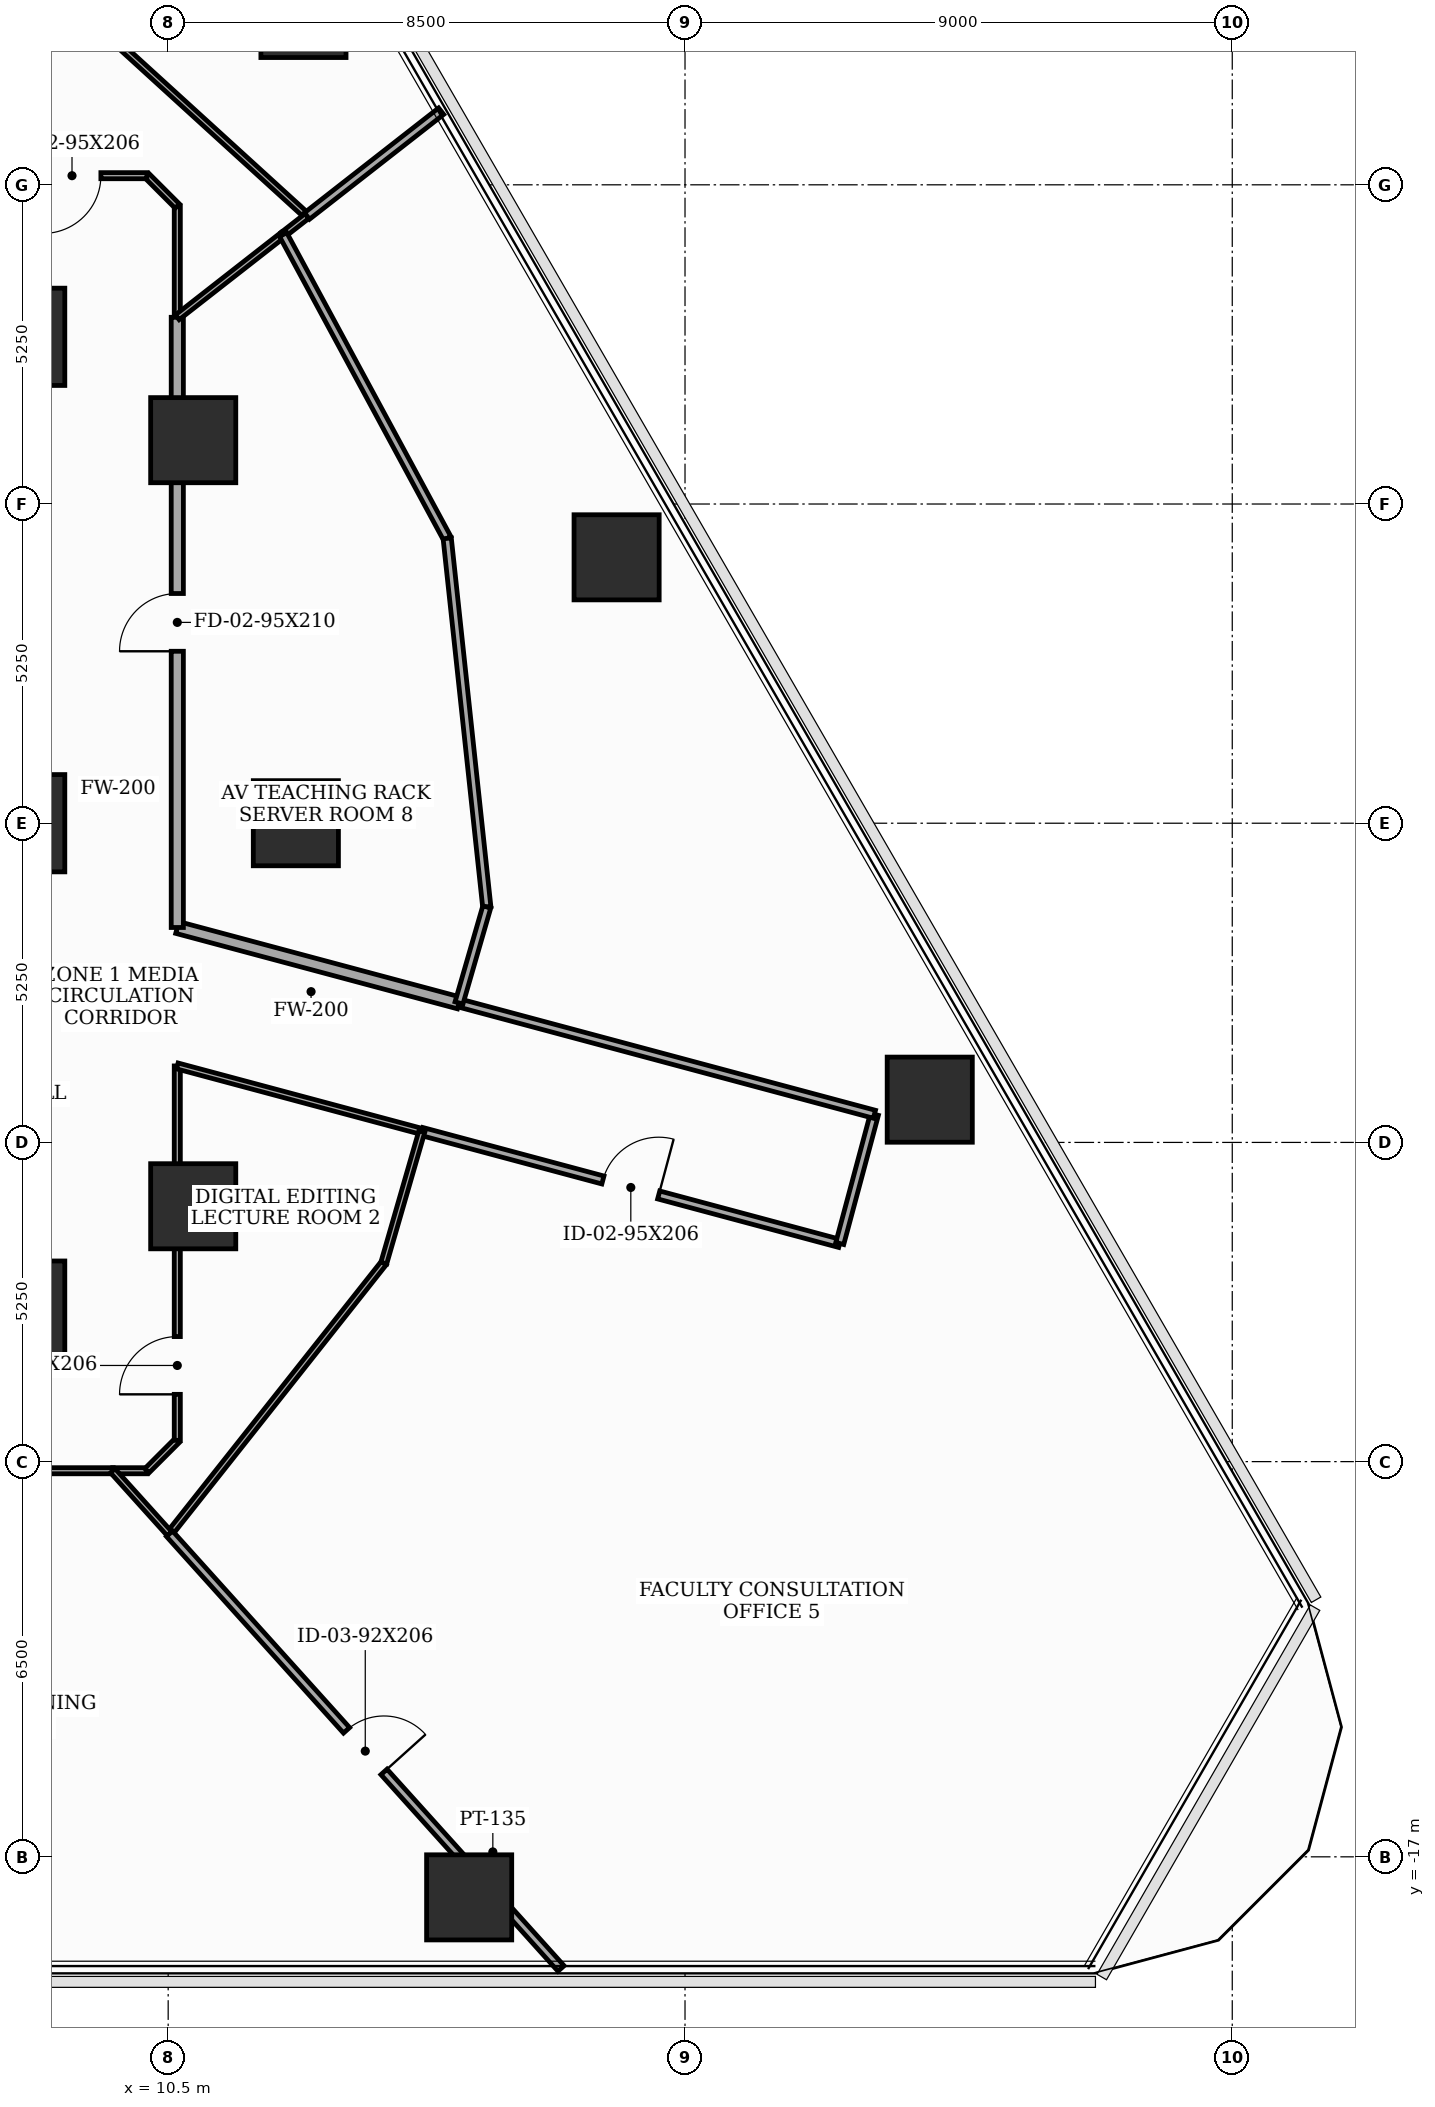
"""IFC4 building model, lengths in metres.
Left out: names, types, materials, properties, quantities, classifications, styles, units other than length and angle.
Written with IfcOpenShell. Run it as: python <this file> out.ifc"""

import sys

from ifc_helpers import new_model, si_unit, direction, frame, frame_2d, origin, origin_2d, place, context, subcontext, project, spatial, rectangle, extrude, element, fill, save


model = new_model("IFC4")
c1 = context("Model", 3, precision=1e-05, world=origin(), true_north=direction((0.0, 1.0)))
c2 = subcontext(c1, "Body", "Model", "MODEL_VIEW")
j1 = project(units=[si_unit("LENGTHUNIT", "METRE"), si_unit("PLANEANGLEUNIT", "RADIAN")], contexts=[c1])
p1 = place(None, origin())
s1 = spatial("IfcSite", under=j1, at=p1, CompositionType="ELEMENT")
p2 = place(p1, origin())
s2 = spatial("IfcBuilding", under=s1, at=p2, CompositionType="ELEMENT")
p3 = place(p2, frame((0.0, 0.0, 51.9)))
s3 = spatial("IfcBuildingStorey", under=s2, at=p3, CompositionType="ELEMENT", Elevation=51.9)
for number, where, z_axis, x_axis in (
    (1, (8.0, -8.0, 0.0), (0.0, 0.0, 1.0), (1.0, 0.0, 0.0)),
    (2, (8.0, 0.0, 0.0), (0.0, 0.0, 1.0), (1.0, 0.0, 0.0)),
    (3, (8.0, 8.0, 0.0), (0.0, 0.0, 1.0), (1.0, 0.0, 0.0)),
):
    element("IfcColumn", number, at=place(p3, frame(where, z_axis=z_axis, x_axis=x_axis)), inside=s3, PredefinedType="COLUMN", context=c2, shape_type="SweptSolid", body=[
        extrude(rectangle(XDim=1.6, YDim=1.6, at=origin_2d()), origin(), (0.0, 0.0, 1.0), 3.7),
    ])
for number, where, z_axis, x_axis in (
    (4, (12.6, 0.0, 0.0), (0.0, 0.0, 1.0), (1.0, 0.0, 0.0)),
    (5, (10.912, 6.3, 0.0), (0.0, 0.0, 1.0), (1.0, 0.0, 0.0)),
    (6, (10.912, -6.3, 0.0), (0.0, 0.0, 1.0), (1.0, 0.0, 0.0)),
    (7, (15.45, -17.667, 0.0), (0.0, 0.0, 1.0), (1.0, 0.0, 0.0)),
    (8, (23.025, -4.547, 0.0), (0.0, 0.0, 1.0), (1.0, 0.0, 0.0)),
    (9, (17.875, 4.373, 0.0), (0.0, 0.0, 1.0), (1.0, 0.0, 0.0)),
    (10, (12.725, 13.293, 0.0), (0.0, 0.0, 1.0), (1.0, 0.0, 0.0)),
):
    element("IfcColumn", number, at=place(p3, frame(where, z_axis=z_axis, x_axis=x_axis)), inside=s3, PredefinedType="COLUMN", context=c2, shape_type="SweptSolid", body=[
        extrude(rectangle(XDim=1.4, YDim=1.4, at=origin_2d()), origin(), (0.0, 0.0, 1.0), 3.7),
    ])
p4 = place(p3, frame((10.65, 8.321, 0.0), z_axis=(0.0, 0.0, 1.0), x_axis=(0.0, 1.0, 0.0)))
e11 = element("IfcWall", 11, at=p4, inside=s3, PredefinedType="MOVABLE", context=c2, shape_type="SweptSolid", body=[
    extrude(rectangle(XDim=1.829, YDim=0.1, at=frame_2d((0.915, 0.0))), origin(), (0.0, 0.0, 1.0), 3.5),
])
p5 = place(p3, frame((10.65, 10.15, 0.0), z_axis=(0.0, 0.0, 1.0), x_axis=(-0.707106781187, 0.707106781187, 0.0)))
e12 = element("IfcWall", 12, at=p5, inside=s3, PredefinedType="MOVABLE", context=c2, shape_type="SweptSolid", body=[
    extrude(rectangle(XDim=0.707, YDim=0.1, at=frame_2d((0.354, 0.0))), origin(), (0.0, 0.0, 1.0), 3.5),
])
p6 = place(p3, frame((10.15, 10.65, 0.0), z_axis=(0.0, 0.0, 1.0), x_axis=(-1.0, 0.0, 0.0)))
e13 = element("IfcWall", 13, at=p6, inside=s3, PredefinedType="MOVABLE", context=c2, shape_type="SweptSolid", body=[
    extrude(rectangle(XDim=6.158, YDim=0.1, at=frame_2d((3.079, 0.0))), origin(), (0.0, 0.0, 1.0), 2.085),
])
p7 = place(p6, frame((0.757, 0.0, 0.0)))
e14 = element("IfcOpeningElement", 14, at=p7, cuts=e13, PredefinedType="OPENING", context=c2, shape_type="SweptSolid", body=[
    extrude(rectangle(XDim=0.95, YDim=2.035, at=frame_2d((0.475, 1.018))), frame((0.0, 0.06, 0.0), z_axis=(0.0, -1.0, 0.0), x_axis=(1.0, 0.0, 0.0)), (0.0, 0.0, 1.0), 0.12),
])
p8 = place(p3, frame((9.589, -10.65, 0.0), z_axis=(0.0, 0.0, 1.0), x_axis=(1.0, 0.0, 0.0)))
e15 = element("IfcWall", 15, at=p8, inside=s3, PredefinedType="MOVABLE", context=c2, shape_type="SweptSolid", body=[
    extrude(rectangle(XDim=0.561, YDim=0.1, at=frame_2d((0.28, 0.0))), origin(), (0.0, 0.0, 1.0), 3.5),
])
p9 = place(p3, frame((10.15, -10.65, 0.0), z_axis=(0.0, 0.0, 1.0), x_axis=(0.707106781187, 0.707106781187, 0.0)))
e16 = element("IfcWall", 16, at=p9, inside=s3, PredefinedType="MOVABLE", context=c2, shape_type="SweptSolid", body=[
    extrude(rectangle(XDim=0.707, YDim=0.1, at=frame_2d((0.354, 0.0))), origin(), (0.0, 0.0, 1.0), 2.085),
])
p10 = place(p3, frame((10.65, -10.15, 0.0), z_axis=(0.0, 0.0, 1.0), x_axis=(0.0, 1.0, 0.0)))
e17 = element("IfcWall", 17, at=p10, inside=s3, PredefinedType="MOVABLE", context=c2, shape_type="SweptSolid", body=[
    extrude(rectangle(XDim=6.158, YDim=0.1, at=frame_2d((3.079, 0.0))), origin(), (0.0, 0.0, 1.0), 2.085),
])
p11 = place(p10, frame((0.757, 0.0, 0.0)))
e18 = element("IfcOpeningElement", 18, at=p11, cuts=e17, PredefinedType="OPENING", context=c2, shape_type="SweptSolid", body=[
    extrude(rectangle(XDim=0.95, YDim=2.035, at=frame_2d((0.475, 1.018))), frame((0.0, 0.06, 0.0), z_axis=(0.0, -1.0, 0.0), x_axis=(1.0, 0.0, 0.0)), (0.0, 0.0, 1.0), 0.12),
])
p12 = place(p3, frame((10.65, -3.992, 0.0), z_axis=(0.0, 0.0, 1.0), x_axis=(0.965903293856, -0.258903122651, 0.0)))
e19 = element("IfcWall", 19, at=p12, inside=s3, PredefinedType="MOVABLE", context=c2, shape_type="SweptSolid", body=[
    extrude(rectangle(XDim=4.164, YDim=0.1, at=frame_2d((2.082, 0.0))), origin(), (0.0, 0.0, 1.0), 2.785),
])
p13 = place(p3, frame((14.672, -5.07, 0.0), z_axis=(0.0, 0.0, 1.0), x_axis=(0.965908991917, -0.258881863664, 0.0)))
e20 = element("IfcWall", 20, at=p13, inside=s3, PredefinedType="PARTITIONING", context=c2, shape_type="SweptSolid", body=[
    extrude(rectangle(XDim=7.115, YDim=0.135, at=frame_2d((3.558, 0.0))), origin(), (0.0, 0.0, 1.0), 2.085),
])
p14 = place(p13, frame((3.083, 0.0, 0.0)))
e21 = element("IfcOpeningElement", 21, at=p14, cuts=e20, PredefinedType="OPENING", context=c2, shape_type="SweptSolid", body=[
    extrude(rectangle(XDim=0.95, YDim=2.035, at=frame_2d((0.475, 1.018))), frame((0.0, 0.077, 0.0), z_axis=(0.0, -1.0, 0.0), x_axis=(1.0, 0.0, 0.0)), (0.0, 0.0, 1.0), 0.155),
])
p15 = place(p3, frame((21.545, -6.912, 0.0), z_axis=(0.0, 0.0, 1.0), x_axis=(0.259105843213, 0.965848933329, 0.0)))
e22 = element("IfcWall", 22, at=p15, inside=s3, PredefinedType="PARTITIONING", context=c2, shape_type="SweptSolid", body=[
    extrude(rectangle(XDim=2.2, YDim=0.135, at=frame_2d((1.1, 0.0))), origin(), (0.0, 0.0, 1.0), 2.085),
])
p16 = place(p3, frame((22.115, -4.787, 0.0), z_axis=(0.0, 0.0, 1.0), x_axis=(-0.96591107063, 0.258874107695, 0.0)))
e23 = element("IfcWall", 23, at=p16, inside=s3, PredefinedType="PARTITIONING", context=c2, shape_type="SweptSolid", body=[
    extrude(rectangle(XDim=7.073, YDim=0.135, at=frame_2d((3.537, 0.0))), origin(), (0.0, 0.0, 1.0), 3.085),
])
p17 = place(p3, frame((15.283, -2.956, 0.0), z_axis=(0.0, 0.0, 1.0), x_axis=(-0.96594964167, 0.258730148528, 0.0)))
e24 = element("IfcWall", 24, at=p17, inside=s3, PredefinedType="SOLIDWALL", context=c2, shape_type="SweptSolid", body=[
    extrude(rectangle(XDim=4.796, YDim=0.2, at=frame_2d((2.398, 0.0))), origin(), (0.0, 0.0, 1.0), 2.785),
])
p18 = place(p3, frame((10.65, -1.715, 0.0), z_axis=(0.0, 0.0, 1.0), x_axis=(0.0, 1.0, 0.0)))
e25 = element("IfcWall", 25, at=p18, inside=s3, PredefinedType="SOLIDWALL", context=c2, shape_type="SweptSolid", body=[
    extrude(rectangle(XDim=10.036, YDim=0.2, at=frame_2d((5.018, 0.0))), origin(), (0.0, 0.0, 1.0), 2.785),
])
p19 = place(p18, frame((4.543, 0.0, 0.0)))
e26 = element("IfcOpeningElement", 26, at=p19, cuts=e25, PredefinedType="OPENING", context=c2, shape_type="SweptSolid", body=[
    extrude(rectangle(XDim=0.95, YDim=2.1, at=frame_2d((0.475, 1.05))), frame((0.0, 0.11, 0.0), z_axis=(0.0, -1.0, 0.0), x_axis=(1.0, 0.0, 0.0)), (0.0, 0.0, 1.0), 0.22),
])
p20 = place(p3, frame((2.45, -10.65, 0.0), z_axis=(0.0, 0.0, 1.0), x_axis=(1.0, 0.0, 0.0)))
e27 = element("IfcWall", 27, at=p20, inside=s3, PredefinedType="MOVABLE", context=c2, shape_type="SweptSolid", body=[
    extrude(rectangle(XDim=7.139, YDim=0.1, at=frame_2d((3.57, 0.0))), origin(), (0.0, 0.0, 1.0), 2.085),
])
p21 = place(p3, frame((12.783, 9.987, 0.0), z_axis=(0.0, 0.0, 1.0), x_axis=(-0.739244565006, 0.6734370595, 0.0)))
e28 = element("IfcWall", 28, at=p21, inside=s3, PredefinedType="MOVABLE", context=c2, shape_type="SweptSolid", body=[
    extrude(rectangle(XDim=5.88, YDim=0.1, at=frame_2d((2.94, 0.0))), origin(), (0.0, 0.0, 1.0), 2.085),
])
p22 = place(p3, frame((12.391, 9.681, 0.0), z_axis=(0.0, 0.0, 1.0), x_axis=(0.788002042991, 0.615672624243, 0.0)))
e29 = element("IfcWall", 29, at=p22, inside=s3, PredefinedType="MOVABLE", context=c2, shape_type="SweptSolid", body=[
    extrude(rectangle(XDim=0.497, YDim=0.1, at=frame_2d((0.249, 0.0))), origin(), (0.0, 0.0, 1.0), 3.5),
])
p23 = place(p3, frame((10.65, 8.321, 0.0), z_axis=(0.0, 0.0, 1.0), x_axis=(0.788124883644, 0.615515367624, 0.0)))
e30 = element("IfcWall", 30, at=p23, inside=s3, PredefinedType="MOVABLE", context=c2, shape_type="SweptSolid", body=[
    extrude(rectangle(XDim=2.209, YDim=0.1, at=frame_2d((1.104, 0.0))), origin(), (0.0, 0.0, 1.0), 3.085),
])
p24 = place(p3, frame((10.522, -11.686, 0.0), z_axis=(0.0, 0.0, 1.0), x_axis=(0.620628051287, 0.784105108997, 0.0)))
e31 = element("IfcWall", 31, at=p24, inside=s3, PredefinedType="MOVABLE", context=c2, shape_type="SweptSolid", body=[
    extrude(rectangle(XDim=5.678, YDim=0.1, at=frame_2d((2.839, 0.0))), origin(), (0.0, 0.0, 1.0), 2.085),
])
p25 = place(p3, frame((14.046, -7.234, 0.0), z_axis=(0.0, 0.0, 1.0), x_axis=(0.277997548775, 0.960581783543, 0.0)))
e32 = element("IfcWall", 32, at=p25, inside=s3, PredefinedType="MOVABLE", context=c2, shape_type="SweptSolid", body=[
    extrude(rectangle(XDim=2.253, YDim=0.1, at=frame_2d((1.126, 0.0))), origin(), (0.0, 0.0, 1.0), 3.5),
])
p26 = place(p3, frame((9.589, -10.65, 0.0), z_axis=(0.0, 0.0, 1.0), x_axis=(0.669100165698, -0.743172233243, 0.0)))
e33 = element("IfcWall", 33, at=p26, inside=s3, PredefinedType="MOVABLE", context=c2, shape_type="SweptSolid", body=[
    extrude(rectangle(XDim=1.394, YDim=0.1, at=frame_2d((0.697, 0.0))), origin(), (0.0, 0.0, 1.0), 3.5),
])
p27 = place(p3, frame((12.783, 9.987, 0.0), z_axis=(0.0, 0.0, 1.0), x_axis=(0.788064029995, 0.615593278576, 0.0)))
e34 = element("IfcWall", 34, at=p27, inside=s3, PredefinedType="PARTITIONING", context=c2, shape_type="SweptSolid", body=[
    extrude(rectangle(XDim=2.8, YDim=0.135, at=frame_2d((1.4, 0.0))), origin(), (0.0, 0.0, 1.0), 2.085),
])
p28 = place(p3, frame((12.391, 9.681, 0.0), z_axis=(0.0, 0.0, 1.0), x_axis=(0.475181539821, -0.879887779329, 0.0)))
e35 = element("IfcWall", 35, at=p28, inside=s3, PredefinedType="PARTITIONING", context=c2, shape_type="SweptSolid", body=[
    extrude(rectangle(XDim=5.678, YDim=0.135, at=frame_2d((2.839, 0.0))), origin(), (0.0, 0.0, 1.0), 2.085),
])
p29 = place(p3, frame((15.089, 4.685, 0.0), z_axis=(0.0, 0.0, 1.0), x_axis=(0.106756517352, -0.994285193495, 0.0)))
e36 = element("IfcWall", 36, at=p29, inside=s3, PredefinedType="PARTITIONING", context=c2, shape_type="SweptSolid", body=[
    extrude(rectangle(XDim=6.097, YDim=0.135, at=frame_2d((3.048, 0.0))), origin(), (0.0, 0.0, 1.0), 2.085),
])
p30 = place(p3, frame((15.74, -1.377, 0.0), z_axis=(0.0, 0.0, 1.0), x_axis=(-0.2780148037, -0.960576789707, 0.0)))
e37 = element("IfcWall", 37, at=p30, inside=s3, PredefinedType="PARTITIONING", context=c2, shape_type="SweptSolid", body=[
    extrude(rectangle(XDim=1.644, YDim=0.135, at=frame_2d((0.822, 0.0))), origin(), (0.0, 0.0, 1.0), 2.085),
])
p31 = place(p3, frame((10.522, -11.686, 0.0), z_axis=(0.0, 0.0, 1.0), x_axis=(0.669132925935, -0.743142736915, 0.0)))
e38 = element("IfcWall", 38, at=p31, inside=s3, PredefinedType="PARTITIONING", context=c2, shape_type="SweptSolid", body=[
    extrude(rectangle(XDim=9.623, YDim=0.135, at=frame_2d((4.811, 0.0))), origin(), (0.0, 0.0, 1.0), 2.085),
])
p32 = place(p31, frame((4.351, 0.0, 0.0)))
e39 = element("IfcOpeningElement", 39, at=p32, cuts=e38, PredefinedType="OPENING", context=c2, shape_type="SweptSolid", body=[
    extrude(rectangle(XDim=0.92, YDim=2.035, at=frame_2d((0.46, 1.018))), frame((0.0, 0.077, 0.0), z_axis=(0.0, -1.0, 0.0), x_axis=(1.0, 0.0, 0.0)), (0.0, 0.0, 1.0), 0.155),
])
p33 = place(p7, origin())
e40 = element("IfcDoor", 40, at=p33, inside=s3, OperationType="SINGLE_SWING_RIGHT", PredefinedType="DOOR", context=c2, shape_type="SweptSolid", body=[
    extrude(rectangle(XDim=0.95, YDim=2.035, at=frame_2d((0.475, 1.018))), frame((0.0, 0.025, 0.0), z_axis=(0.0, -1.0, 0.0), x_axis=(1.0, 0.0, 0.0)), (0.0, 0.0, 1.0), 0.05),
])
fill(e14, e40)
p34 = place(p11, origin())
e41 = element("IfcDoor", 41, at=p34, inside=s3, OperationType="SINGLE_SWING_LEFT", PredefinedType="DOOR", context=c2, shape_type="SweptSolid", body=[
    extrude(rectangle(XDim=0.95, YDim=2.035, at=frame_2d((0.475, 1.018))), frame((0.0, 0.025, 0.0), z_axis=(0.0, -1.0, 0.0), x_axis=(1.0, 0.0, 0.0)), (0.0, 0.0, 1.0), 0.05),
])
fill(e18, e41)
p35 = place(p14, origin())
e42 = element("IfcDoor", 42, at=p35, inside=s3, OperationType="SINGLE_SWING_RIGHT", PredefinedType="DOOR", context=c2, shape_type="SweptSolid", body=[
    extrude(rectangle(XDim=0.95, YDim=2.035, at=frame_2d((0.475, 1.018))), frame((0.0, 0.025, 0.0), z_axis=(0.0, -1.0, 0.0), x_axis=(1.0, 0.0, 0.0)), (0.0, 0.0, 1.0), 0.05),
])
fill(e21, e42)
p36 = place(p19, origin())
e43 = element("IfcDoor", 43, at=p36, inside=s3, OperationType="SINGLE_SWING_LEFT", PredefinedType="DOOR", context=c2, shape_type="SweptSolid", body=[
    extrude(rectangle(XDim=0.95, YDim=2.1, at=frame_2d((0.475, 1.05))), frame((0.0, 0.025, 0.0), z_axis=(0.0, -1.0, 0.0), x_axis=(1.0, 0.0, 0.0)), (0.0, 0.0, 1.0), 0.05),
])
fill(e26, e43)
p37 = place(p32, origin())
e44 = element("IfcDoor", 44, at=p37, inside=s3, OperationType="SINGLE_SWING_RIGHT", PredefinedType="DOOR", context=c2, shape_type="SweptSolid", body=[
    extrude(rectangle(XDim=0.92, YDim=2.035, at=frame_2d((0.46, 1.018))), frame((0.0, 0.025, 0.0), z_axis=(0.0, -1.0, 0.0), x_axis=(1.0, 0.0, 0.0)), (0.0, 0.0, 1.0), 0.05),
])
fill(e39, e44)
save(model, sys.argv[1])
